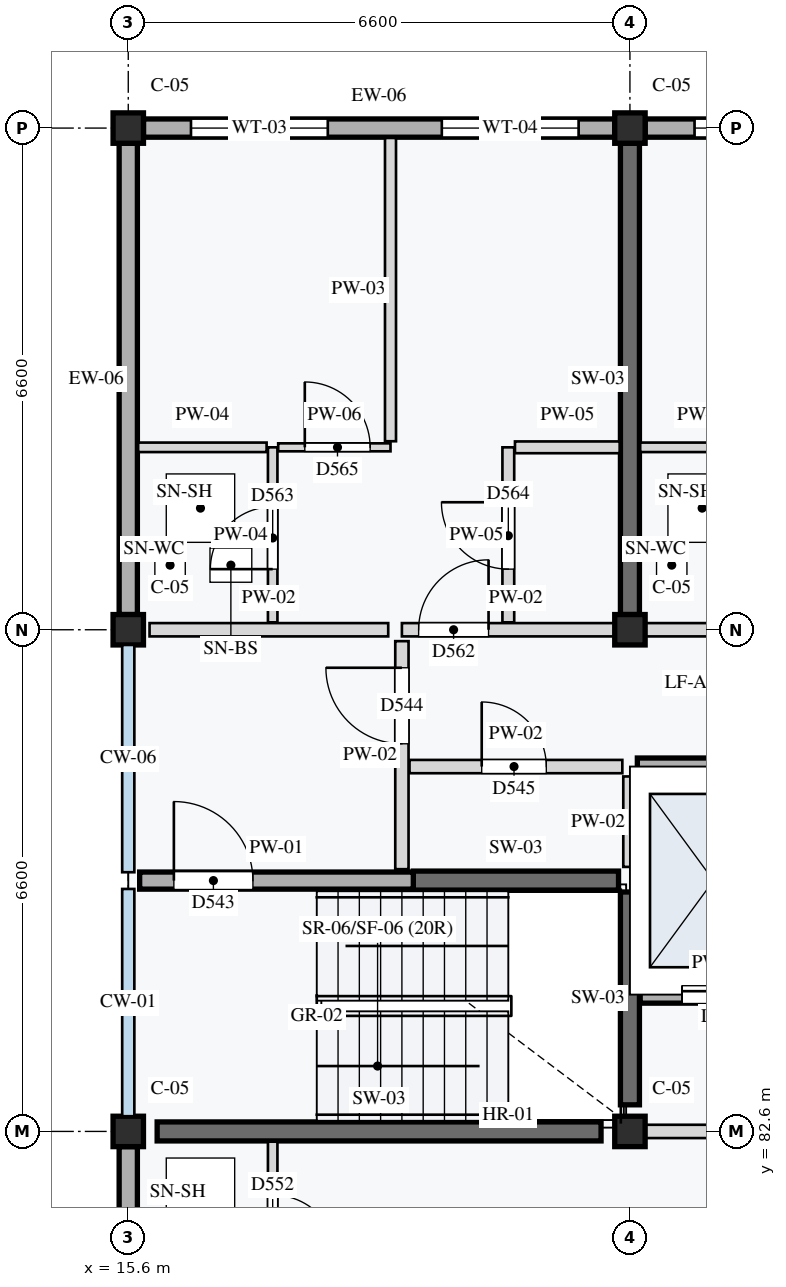
"""IFC4 building model, lengths in metres.
Left out: names, types, materials, properties, quantities, classifications, styles, units other than length and angle.
Written with IfcOpenShell. Run it as: python <this file> out.ifc"""

import sys

from ifc_helpers import new_model, si_unit, direction, frame, frame_2d, origin, origin_2d, place, context, subcontext, project, spatial, rectangle, extrude, element, fill, save


model = new_model("IFC4")
c1 = context("Model", 3, precision=1e-05, world=origin(), true_north=direction((0.0, 1.0)))
c2 = subcontext(c1, "Body", "Model", "MODEL_VIEW")
j1 = project(units=[si_unit("LENGTHUNIT", "METRE"), si_unit("PLANEANGLEUNIT", "RADIAN")], contexts=[c1])
p1 = place(None, origin())
s1 = spatial("IfcSite", under=j1, at=p1, CompositionType="ELEMENT")
p2 = place(p1, origin())
s2 = spatial("IfcBuilding", under=s1, at=p2, CompositionType="ELEMENT")
p3 = place(p2, frame((0.0, 0.0, 56.4)))
s3 = spatial("IfcBuildingStorey", under=s2, at=p3, CompositionType="ELEMENT", Elevation=56.4)
for number, where, z_axis, x_axis in (
    (1, (15.6, 82.6, 0.0), (0.0, 0.0, 1.0), (1.0, 0.0, 0.0)),
    (2, (15.6, 89.2, 0.0), (0.0, 0.0, 1.0), (1.0, 0.0, 0.0)),
    (3, (15.6, 95.8, 0.0), (0.0, 0.0, 1.0), (1.0, 0.0, 0.0)),
    (4, (22.2, 82.6, 0.0), (0.0, 0.0, 1.0), (1.0, 0.0, 0.0)),
    (5, (22.2, 89.2, 0.0), (0.0, 0.0, 1.0), (1.0, 0.0, 0.0)),
    (6, (22.2, 95.8, 0.0), (0.0, 0.0, 1.0), (1.0, 0.0, 0.0)),
):
    element("IfcColumn", number, at=place(p3, frame(where, z_axis=z_axis, x_axis=x_axis)), inside=s3, PredefinedType="COLUMN", context=c2, shape_type="SweptSolid", body=[
        extrude(rectangle(XDim=0.4, YDim=0.4, at=origin_2d()), origin(), (0.0, 0.0, 1.0), 3.2),
    ])
p4 = place(p3, frame((15.98, 82.6, 0.0), z_axis=(0.0, 0.0, 1.0), x_axis=(1.0, 0.0, 0.0)))
e7 = element("IfcWall", 7, at=p4, inside=s3, PredefinedType="SHEAR", context=c2, shape_type="SweptSolid", body=[
    extrude(rectangle(XDim=5.84, YDim=0.25, at=frame_2d((2.92, 0.0))), origin(), (0.0, 0.0, 1.0), 2.93),
])
p5 = place(p3, frame((19.35, 85.9, 0.0), z_axis=(0.0, 0.0, 1.0), x_axis=(1.0, 0.0, 0.0)))
e8 = element("IfcWall", 8, at=p5, inside=s3, PredefinedType="SHEAR", context=c2, shape_type="SweptSolid", body=[
    extrude(rectangle(XDim=2.7, YDim=0.25, at=frame_2d((1.35, 0.0))), origin(), (0.0, 0.0, 1.0), 2.93),
])
p6 = place(p3, frame((22.2, 82.95, 0.0), z_axis=(0.0, 0.0, 1.0), x_axis=(0.0, 1.0, 0.0)))
e9 = element("IfcWall", 9, at=p6, inside=s3, PredefinedType="SHEAR", context=c2, shape_type="SweptSolid", body=[
    extrude(rectangle(XDim=2.8, YDim=0.25, at=frame_2d((1.4, 0.0))), origin(), (0.0, 0.0, 1.0), 2.93),
])
p7 = place(p3, frame((22.2, 89.4, 0.0), z_axis=(0.0, 0.0, 1.0), x_axis=(0.0, 1.0, 0.0)))
e10 = element("IfcWall", 10, at=p7, inside=s3, PredefinedType="SHEAR", context=c2, shape_type="SweptSolid", body=[
    extrude(rectangle(XDim=6.2, YDim=0.25, at=frame_2d((3.1, 0.0))), origin(), (0.0, 0.0, 1.0), 2.93),
])
p8 = place(p3, frame((15.8, 95.8, 0.0), z_axis=(0.0, 0.0, 1.0), x_axis=(1.0, 0.0, 0.0)))
e11 = element("IfcWall", 11, at=p8, inside=s3, PredefinedType="STANDARD", context=c2, shape_type="SweptSolid", body=[
    extrude(rectangle(XDim=6.2, YDim=0.24, at=frame_2d((3.1, 0.0))), origin(), (0.0, 0.0, 1.0), 2.65),
])
p9 = place(p8, frame((0.625, 0.0, 0.85)))
e12 = element("IfcOpeningElement", 12, at=p9, cuts=e11, PredefinedType="OPENING", context=c2, shape_type="SweptSolid", body=[
    extrude(rectangle(XDim=1.8, YDim=1.35, at=frame_2d((0.9, 0.675))), frame((0.0, 0.13, 0.0), z_axis=(0.0, -1.0, 0.0), x_axis=(1.0, 0.0, 0.0)), (0.0, 0.0, 1.0), 0.26),
])
p10 = place(p8, frame((3.925, 0.0, 0.85)))
e13 = element("IfcOpeningElement", 13, at=p10, cuts=e11, PredefinedType="OPENING", context=c2, shape_type="SweptSolid", body=[
    extrude(rectangle(XDim=1.8, YDim=1.55, at=frame_2d((0.9, 0.775))), frame((0.0, 0.13, 0.0), z_axis=(0.0, -1.0, 0.0), x_axis=(1.0, 0.0, 0.0)), (0.0, 0.0, 1.0), 0.26),
])
p11 = place(p3, frame((22.4, 95.8, 0.0), z_axis=(0.0, 0.0, 1.0), x_axis=(1.0, 0.0, 0.0)))
e14 = element("IfcWall", 14, at=p11, inside=s3, PredefinedType="STANDARD", context=c2, shape_type="SweptSolid", body=[
    extrude(rectangle(XDim=6.2, YDim=0.24, at=frame_2d((3.1, 0.0))), origin(), (0.0, 0.0, 1.0), 2.65),
])
p12 = place(p11, frame((0.65, 0.0, 0.85)))
e15 = element("IfcOpeningElement", 15, at=p12, cuts=e14, PredefinedType="OPENING", context=c2, shape_type="SweptSolid", body=[
    extrude(rectangle(XDim=1.8, YDim=1.35, at=frame_2d((0.9, 0.675))), frame((0.0, 0.13, 0.0), z_axis=(0.0, -1.0, 0.0), x_axis=(1.0, 0.0, 0.0)), (0.0, 0.0, 1.0), 0.26),
])
p13 = place(p11, frame((4.05, 0.0, 0.85)))
e16 = element("IfcOpeningElement", 16, at=p13, cuts=e14, PredefinedType="OPENING", context=c2, shape_type="SweptSolid", body=[
    extrude(rectangle(XDim=1.5, YDim=1.35, at=frame_2d((0.75, 0.675))), frame((0.0, 0.13, 0.0), z_axis=(0.0, -1.0, 0.0), x_axis=(1.0, 0.0, 0.0)), (0.0, 0.0, 1.0), 0.26),
])
p14 = place(p3, frame((15.6, 76.2, 0.0), z_axis=(0.0, 0.0, 1.0), x_axis=(0.0, 1.0, 0.0)))
e17 = element("IfcWall", 17, at=p14, inside=s3, PredefinedType="STANDARD", context=c2, shape_type="SweptSolid", body=[
    extrude(rectangle(XDim=6.2, YDim=0.24, at=frame_2d((3.1, 0.0))), origin(), (0.0, 0.0, 1.0), 2.65),
])
p15 = place(p3, frame((15.6, 89.4, 0.0), z_axis=(0.0, 0.0, 1.0), x_axis=(0.0, 1.0, 0.0)))
e18 = element("IfcWall", 18, at=p15, inside=s3, PredefinedType="STANDARD", context=c2, shape_type="SweptSolid", body=[
    extrude(rectangle(XDim=6.2, YDim=0.24, at=frame_2d((3.1, 0.0))), origin(), (0.0, 0.0, 1.0), 2.65),
])
p16 = place(p3, frame((15.75, 85.9, 0.0), z_axis=(0.0, 0.0, 1.0), x_axis=(1.0, 0.0, 0.0)))
e19 = element("IfcWall", 19, at=p16, inside=s3, PredefinedType="STANDARD", context=c2, shape_type="SweptSolid", body=[
    extrude(rectangle(XDim=3.6, YDim=0.225, at=frame_2d((1.8, 0.0))), origin(), (0.0, 0.0, 1.0), 2.93),
])
p17 = place(p16, frame((0.45, 0.0, 0.0)))
e20 = element("IfcOpeningElement", 20, at=p17, cuts=e19, PredefinedType="OPENING", context=c2, shape_type="SweptSolid", body=[
    extrude(rectangle(XDim=1.04, YDim=2.12, at=frame_2d((0.52, 1.06))), frame((0.0, 0.123, 0.0), z_axis=(0.0, -1.0, 0.0), x_axis=(1.0, 0.0, 0.0)), (0.0, 0.0, 1.0), 0.245),
])
p18 = place(p3, frame((19.2, 86.05, 0.0), z_axis=(0.0, 0.0, 1.0), x_axis=(0.0, 1.0, 0.0)))
e21 = element("IfcWall", 21, at=p18, inside=s3, PredefinedType="PARTITIONING", context=c2, shape_type="SweptSolid", body=[
    extrude(rectangle(XDim=3.0, YDim=0.175, at=frame_2d((1.5, 0.0))), origin(), (0.0, 0.0, 1.0), 2.93),
])
p19 = place(p18, frame((1.65, 0.0, 0.0)))
e22 = element("IfcOpeningElement", 22, at=p19, cuts=e21, PredefinedType="OPENING", context=c2, shape_type="SweptSolid", body=[
    extrude(rectangle(XDim=1.0, YDim=2.1, at=frame_2d((0.5, 1.05))), frame((0.0, 0.097, 0.0), z_axis=(0.0, -1.0, 0.0), x_axis=(1.0, 0.0, 0.0)), (0.0, 0.0, 1.0), 0.195),
])
p20 = place(p3, frame((19.3, 87.4, 0.0), z_axis=(0.0, 0.0, 1.0), x_axis=(1.0, 0.0, 0.0)))
e23 = element("IfcWall", 23, at=p20, inside=s3, PredefinedType="PARTITIONING", context=c2, shape_type="SweptSolid", body=[
    extrude(rectangle(XDim=2.8, YDim=0.175, at=frame_2d((1.4, 0.0))), origin(), (0.0, 0.0, 1.0), 2.93),
])
p21 = place(p20, frame((0.95, 0.0, 0.0)))
e24 = element("IfcOpeningElement", 24, at=p21, cuts=e23, PredefinedType="OPENING", context=c2, shape_type="SweptSolid", body=[
    extrude(rectangle(XDim=0.85, YDim=2.0, at=frame_2d((0.425, 1.0))), frame((0.0, 0.097, 0.0), z_axis=(0.0, -1.0, 0.0), x_axis=(1.0, 0.0, 0.0)), (0.0, 0.0, 1.0), 0.195),
])
p22 = place(p3, frame((22.2, 86.08, 0.0), z_axis=(0.0, 0.0, 1.0), x_axis=(0.0, 1.0, 0.0)))
e25 = element("IfcWall", 25, at=p22, inside=s3, PredefinedType="PARTITIONING", context=c2, shape_type="SweptSolid", body=[
    extrude(rectangle(XDim=1.19, YDim=0.175, at=frame_2d((0.595, 0.0))), origin(), (0.0, 0.0, 1.0), 2.93),
])
p23 = place(p3, frame((22.335, 84.4, 0.0), z_axis=(0.0, 0.0, 1.0), x_axis=(1.0, 0.0, 0.0)))
e26 = element("IfcWall", 26, at=p23, inside=s3, PredefinedType="STANDARD", context=c2, shape_type="SweptSolid", body=[
    extrude(rectangle(XDim=2.065, YDim=0.225, at=frame_2d((1.032, 0.0))), origin(), (0.0, 0.0, 1.0), 2.93),
])
p24 = place(p23, frame((0.55, 0.0, 0.0)))
e27 = element("IfcOpeningElement", 27, at=p24, cuts=e26, PredefinedType="OPENING", context=c2, shape_type="SweptSolid", body=[
    extrude(rectangle(XDim=1.1, YDim=2.1, at=frame_2d((0.55, 1.05))), frame((0.0, 0.123, 0.0), z_axis=(0.0, -1.0, 0.0), x_axis=(1.0, 0.0, 0.0)), (0.0, 0.0, 1.0), 0.245),
])
p25 = place(p3, frame((22.298, 87.4, 0.0), z_axis=(0.0, 0.0, 1.0), x_axis=(1.0, 0.0, 0.0)))
e28 = element("IfcWall", 28, at=p25, inside=s3, PredefinedType="STANDARD", context=c2, shape_type="SweptSolid", body=[
    extrude(rectangle(XDim=4.022, YDim=0.225, at=frame_2d((2.011, 0.0))), origin(), (0.0, 0.0, 1.0), 2.93),
])
p26 = place(p3, frame((22.2, 82.6, 0.0), z_axis=(0.0, 0.0, 1.0), x_axis=(1.0, 0.0, 0.0)))
e29 = element("IfcWall", 29, at=p26, inside=s3, PredefinedType="PARTITIONING", context=c2, shape_type="SweptSolid", body=[
    extrude(rectangle(XDim=6.6, YDim=0.175, at=frame_2d((3.3, 0.0))), origin(), (0.0, 0.0, 1.0), 2.55),
])
p27 = place(p26, frame((1.7, 0.0, 0.0)))
e30 = element("IfcOpeningElement", 30, at=p27, cuts=e29, PredefinedType="OPENING", context=c2, shape_type="SweptSolid", body=[
    extrude(rectangle(XDim=0.96, YDim=2.18, at=frame_2d((0.48, 1.09))), frame((0.0, 0.097, 0.0), z_axis=(0.0, -1.0, 0.0), x_axis=(1.0, 0.0, 0.0)), (0.0, 0.0, 1.0), 0.195),
])
p28 = place(p3, frame((17.5, 82.465, 0.0), z_axis=(0.0, 0.0, 1.0), x_axis=(0.0, -1.0, 0.0)))
e31 = element("IfcWall", 31, at=p28, inside=s3, PredefinedType="PARTITIONING", context=c2, shape_type="SweptSolid", body=[
    extrude(rectangle(XDim=2.265, YDim=0.125, at=frame_2d((1.133, 0.0))), origin(), (0.0, 0.0, 1.0), 2.93),
])
p29 = place(p28, frame((0.7, 0.0, 0.0)))
e32 = element("IfcOpeningElement", 32, at=p29, cuts=e31, PredefinedType="OPENING", context=c2, shape_type="SweptSolid", body=[
    extrude(rectangle(XDim=0.85, YDim=2.04, at=frame_2d((0.425, 1.02))), frame((0.0, 0.073, 0.0), z_axis=(0.0, -1.0, 0.0), x_axis=(1.0, 0.0, 0.0)), (0.0, 0.0, 1.0), 0.145),
])
p30 = place(p3, frame((15.88, 89.2, 0.0), z_axis=(0.0, 0.0, 1.0), x_axis=(1.0, 0.0, 0.0)))
e33 = element("IfcWall", 33, at=p30, inside=s3, PredefinedType="PARTITIONING", context=c2, shape_type="SweptSolid", body=[
    extrude(rectangle(XDim=3.14, YDim=0.175, at=frame_2d((1.57, 0.0))), origin(), (0.0, 0.0, 1.0), 2.55),
])
p31 = place(p3, frame((19.2, 89.2, 0.0), z_axis=(0.0, 0.0, 1.0), x_axis=(1.0, 0.0, 0.0)))
e34 = element("IfcWall", 34, at=p31, inside=s3, PredefinedType="PARTITIONING", context=c2, shape_type="SweptSolid", body=[
    extrude(rectangle(XDim=3.0, YDim=0.175, at=frame_2d((1.5, 0.0))), origin(), (0.0, 0.0, 1.0), 2.55),
])
p32 = place(p31, frame((0.22, 0.0, 0.0)))
e35 = element("IfcOpeningElement", 35, at=p32, cuts=e34, PredefinedType="OPENING", context=c2, shape_type="SweptSolid", body=[
    extrude(rectangle(XDim=0.92, YDim=2.14, at=frame_2d((0.46, 1.07))), frame((0.0, 0.097, 0.0), z_axis=(0.0, -1.0, 0.0), x_axis=(1.0, 0.0, 0.0)), (0.0, 0.0, 1.0), 0.195),
])
p33 = place(p3, frame((17.5, 89.298, 0.0), z_axis=(0.0, 0.0, 1.0), x_axis=(0.0, 1.0, 0.0)))
e36 = element("IfcWall", 36, at=p33, inside=s3, PredefinedType="PARTITIONING", context=c2, shape_type="SweptSolid", body=[
    extrude(rectangle(XDim=2.302, YDim=0.125, at=frame_2d((1.151, 0.0))), origin(), (0.0, 0.0, 1.0), 2.93),
])
p34 = place(p33, frame((0.7, 0.0, 0.0)))
e37 = element("IfcOpeningElement", 37, at=p34, cuts=e36, PredefinedType="OPENING", context=c2, shape_type="SweptSolid", body=[
    extrude(rectangle(XDim=0.82, YDim=2.05, at=frame_2d((0.41, 1.025))), frame((0.0, 0.073, 0.0), z_axis=(0.0, -1.0, 0.0), x_axis=(1.0, 0.0, 0.0)), (0.0, 0.0, 1.0), 0.145),
])
p35 = place(p3, frame((15.73, 91.6, 0.0), z_axis=(0.0, 0.0, 1.0), x_axis=(1.0, 0.0, 0.0)))
e38 = element("IfcWall", 38, at=p35, inside=s3, PredefinedType="PARTITIONING", context=c2, shape_type="SweptSolid", body=[
    extrude(rectangle(XDim=1.69, YDim=0.125, at=frame_2d((0.845, 0.0))), origin(), (0.0, 0.0, 1.0), 2.93),
])
p36 = place(p3, frame((20.6, 89.298, 0.0), z_axis=(0.0, 0.0, 1.0), x_axis=(0.0, 1.0, 0.0)))
e39 = element("IfcWall", 39, at=p36, inside=s3, PredefinedType="PARTITIONING", context=c2, shape_type="SweptSolid", body=[
    extrude(rectangle(XDim=2.302, YDim=0.155, at=frame_2d((1.151, 0.0))), origin(), (0.0, 0.0, 1.0), 2.93),
])
p37 = place(p36, frame((0.7, 0.0, 0.0)))
e40 = element("IfcOpeningElement", 40, at=p37, cuts=e39, PredefinedType="OPENING", context=c2, shape_type="SweptSolid", body=[
    extrude(rectangle(XDim=0.88, YDim=2.16, at=frame_2d((0.44, 1.08))), frame((0.0, 0.087, 0.0), z_axis=(0.0, -1.0, 0.0), x_axis=(1.0, 0.0, 0.0)), (0.0, 0.0, 1.0), 0.175),
])
p38 = place(p3, frame((20.688, 91.6, 0.0), z_axis=(0.0, 0.0, 1.0), x_axis=(1.0, 0.0, 0.0)))
e41 = element("IfcWall", 41, at=p38, inside=s3, PredefinedType="PARTITIONING", context=c2, shape_type="SweptSolid", body=[
    extrude(rectangle(XDim=1.377, YDim=0.155, at=frame_2d((0.689, 0.0))), origin(), (0.0, 0.0, 1.0), 2.93),
])
p39 = place(p3, frame((17.573, 91.6, 0.0), z_axis=(0.0, 0.0, 1.0), x_axis=(1.0, 0.0, 0.0)))
e42 = element("IfcWall", 42, at=p39, inside=s3, PredefinedType="PARTITIONING", context=c2, shape_type="SweptSolid", body=[
    extrude(rectangle(XDim=1.478, YDim=0.105, at=frame_2d((0.739, 0.0))), origin(), (0.0, 0.0, 1.0), 2.93),
])
p40 = place(p39, frame((0.35, 0.0, 0.0)))
e43 = element("IfcOpeningElement", 43, at=p40, cuts=e42, PredefinedType="OPENING", context=c2, shape_type="SweptSolid", body=[
    extrude(rectangle(XDim=0.86, YDim=2.12, at=frame_2d((0.43, 1.06))), frame((0.0, 0.062, 0.0), z_axis=(0.0, -1.0, 0.0), x_axis=(1.0, 0.0, 0.0)), (0.0, 0.0, 1.0), 0.125),
])
p41 = place(p3, frame((19.05, 91.68, 0.0), z_axis=(0.0, 0.0, 1.0), x_axis=(0.0, 1.0, 0.0)))
e44 = element("IfcWall", 44, at=p41, inside=s3, PredefinedType="PARTITIONING", context=c2, shape_type="SweptSolid", body=[
    extrude(rectangle(XDim=3.99, YDim=0.145, at=frame_2d((1.995, 0.0))), origin(), (0.0, 0.0, 1.0), 2.93),
])
p42 = place(p3, frame((22.2, 89.2, 0.0), z_axis=(0.0, 0.0, 1.0), x_axis=(1.0, 0.0, 0.0)))
e45 = element("IfcWall", 45, at=p42, inside=s3, PredefinedType="PARTITIONING", context=c2, shape_type="SweptSolid", body=[
    extrude(rectangle(XDim=6.6, YDim=0.175, at=frame_2d((3.3, 0.0))), origin(), (0.0, 0.0, 1.0), 2.55),
])
p43 = place(p42, frame((3.85, 0.0, 0.0)))
e46 = element("IfcOpeningElement", 46, at=p43, cuts=e45, PredefinedType="OPENING", context=c2, shape_type="SweptSolid", body=[
    extrude(rectangle(XDim=0.92, YDim=2.14, at=frame_2d((0.46, 1.07))), frame((0.0, 0.097, 0.0), z_axis=(0.0, -1.0, 0.0), x_axis=(1.0, 0.0, 0.0)), (0.0, 0.0, 1.0), 0.195),
])
p44 = place(p3, frame((22.335, 91.6, 0.0), z_axis=(0.0, 0.0, 1.0), x_axis=(1.0, 0.0, 0.0)))
e47 = element("IfcWall", 47, at=p44, inside=s3, PredefinedType="PARTITIONING", context=c2, shape_type="SweptSolid", body=[
    extrude(rectangle(XDim=1.685, YDim=0.125, at=frame_2d((0.843, 0.0))), origin(), (0.0, 0.0, 1.0), 2.93),
])
p45 = place(p9, origin())
e48 = element("IfcWindow", 48, at=p45, inside=s3, PartitioningType="SINGLE_PANEL", PredefinedType="WINDOW", context=c2, shape_type="SweptSolid", body=[
    extrude(rectangle(XDim=1.8, YDim=1.35, at=frame_2d((0.9, 0.675))), frame((0.0, 0.03, 0.0), z_axis=(0.0, -1.0, 0.0), x_axis=(1.0, 0.0, 0.0)), (0.0, 0.0, 1.0), 0.06),
])
fill(e12, e48)
p46 = place(p10, origin())
e49 = element("IfcWindow", 49, at=p46, inside=s3, PartitioningType="SINGLE_PANEL", PredefinedType="WINDOW", context=c2, shape_type="SweptSolid", body=[
    extrude(rectangle(XDim=1.8, YDim=1.55, at=frame_2d((0.9, 0.775))), frame((0.0, 0.03, 0.0), z_axis=(0.0, -1.0, 0.0), x_axis=(1.0, 0.0, 0.0)), (0.0, 0.0, 1.0), 0.06),
])
fill(e13, e49)
p47 = place(p12, origin())
e50 = element("IfcWindow", 50, at=p47, inside=s3, PartitioningType="SINGLE_PANEL", PredefinedType="WINDOW", context=c2, shape_type="SweptSolid", body=[
    extrude(rectangle(XDim=1.8, YDim=1.35, at=frame_2d((0.9, 0.675))), frame((0.0, 0.03, 0.0), z_axis=(0.0, -1.0, 0.0), x_axis=(1.0, 0.0, 0.0)), (0.0, 0.0, 1.0), 0.06),
])
fill(e15, e50)
p48 = place(p17, origin())
e51 = element("IfcDoor", 51, at=p48, inside=s3, OperationType="SINGLE_SWING_LEFT", PredefinedType="DOOR", context=c2, shape_type="SweptSolid", body=[
    extrude(rectangle(XDim=1.04, YDim=2.12, at=frame_2d((0.52, 1.06))), frame((0.0, 0.025, 0.0), z_axis=(0.0, -1.0, 0.0), x_axis=(1.0, 0.0, 0.0)), (0.0, 0.0, 1.0), 0.05),
])
fill(e20, e51)
p49 = place(p19, origin())
e52 = element("IfcDoor", 52, at=p49, inside=s3, OperationType="SINGLE_SWING_RIGHT", PredefinedType="DOOR", context=c2, shape_type="SweptSolid", body=[
    extrude(rectangle(XDim=1.0, YDim=2.1, at=frame_2d((0.5, 1.05))), frame((0.0, 0.025, 0.0), z_axis=(0.0, -1.0, 0.0), x_axis=(1.0, 0.0, 0.0)), (0.0, 0.0, 1.0), 0.05),
])
fill(e22, e52)
p50 = place(p21, origin())
e53 = element("IfcDoor", 53, at=p50, inside=s3, OperationType="SINGLE_SWING_LEFT", PredefinedType="DOOR", context=c2, shape_type="SweptSolid", body=[
    extrude(rectangle(XDim=0.85, YDim=2.0, at=frame_2d((0.425, 1.0))), frame((0.0, 0.025, 0.0), z_axis=(0.0, -1.0, 0.0), x_axis=(1.0, 0.0, 0.0)), (0.0, 0.0, 1.0), 0.05),
])
fill(e24, e53)
p51 = place(p24, origin())
e54 = element("IfcDoor", 54, at=p51, inside=s3, OperationType="DOUBLE_DOOR_SLIDING", PredefinedType="DOOR", context=c2, shape_type="SweptSolid", body=[
    extrude(rectangle(XDim=1.1, YDim=2.1, at=frame_2d((0.55, 1.05))), frame((0.0, 0.025, 0.0), z_axis=(0.0, -1.0, 0.0), x_axis=(1.0, 0.0, 0.0)), (0.0, 0.0, 1.0), 0.05),
])
fill(e27, e54)
p52 = place(p29, origin())
e55 = element("IfcDoor", 55, at=p52, inside=s3, OperationType="SINGLE_SWING_RIGHT", PredefinedType="DOOR", context=c2, shape_type="SweptSolid", body=[
    extrude(rectangle(XDim=0.85, YDim=2.04, at=frame_2d((0.425, 1.02))), frame((0.0, 0.025, 0.0), z_axis=(0.0, -1.0, 0.0), x_axis=(1.0, 0.0, 0.0)), (0.0, 0.0, 1.0), 0.05),
])
fill(e32, e55)
p53 = place(p32, origin())
e56 = element("IfcDoor", 56, at=p53, inside=s3, OperationType="SINGLE_SWING_RIGHT", PredefinedType="DOOR", context=c2, shape_type="SweptSolid", body=[
    extrude(rectangle(XDim=0.92, YDim=2.14, at=frame_2d((0.46, 1.07))), frame((0.0, 0.025, 0.0), z_axis=(0.0, -1.0, 0.0), x_axis=(1.0, 0.0, 0.0)), (0.0, 0.0, 1.0), 0.05),
])
fill(e35, e56)
p54 = place(p34, origin())
e57 = element("IfcDoor", 57, at=p54, inside=s3, OperationType="SINGLE_SWING_LEFT", PredefinedType="DOOR", context=c2, shape_type="SweptSolid", body=[
    extrude(rectangle(XDim=0.82, YDim=2.05, at=frame_2d((0.41, 1.025))), frame((0.0, 0.025, 0.0), z_axis=(0.0, -1.0, 0.0), x_axis=(1.0, 0.0, 0.0)), (0.0, 0.0, 1.0), 0.05),
])
fill(e37, e57)
p55 = place(p37, origin())
e58 = element("IfcDoor", 58, at=p55, inside=s3, OperationType="SINGLE_SWING_RIGHT", PredefinedType="DOOR", context=c2, shape_type="SweptSolid", body=[
    extrude(rectangle(XDim=0.88, YDim=2.16, at=frame_2d((0.44, 1.08))), frame((0.0, 0.025, 0.0), z_axis=(0.0, -1.0, 0.0), x_axis=(1.0, 0.0, 0.0)), (0.0, 0.0, 1.0), 0.05),
])
fill(e40, e58)
p56 = place(p40, origin())
e59 = element("IfcDoor", 59, at=p56, inside=s3, OperationType="SINGLE_SWING_LEFT", PredefinedType="DOOR", context=c2, shape_type="SweptSolid", body=[
    extrude(rectangle(XDim=0.86, YDim=2.12, at=frame_2d((0.43, 1.06))), frame((0.0, 0.025, 0.0), z_axis=(0.0, -1.0, 0.0), x_axis=(1.0, 0.0, 0.0)), (0.0, 0.0, 1.0), 0.05),
])
fill(e43, e59)
save(model, sys.argv[1])
